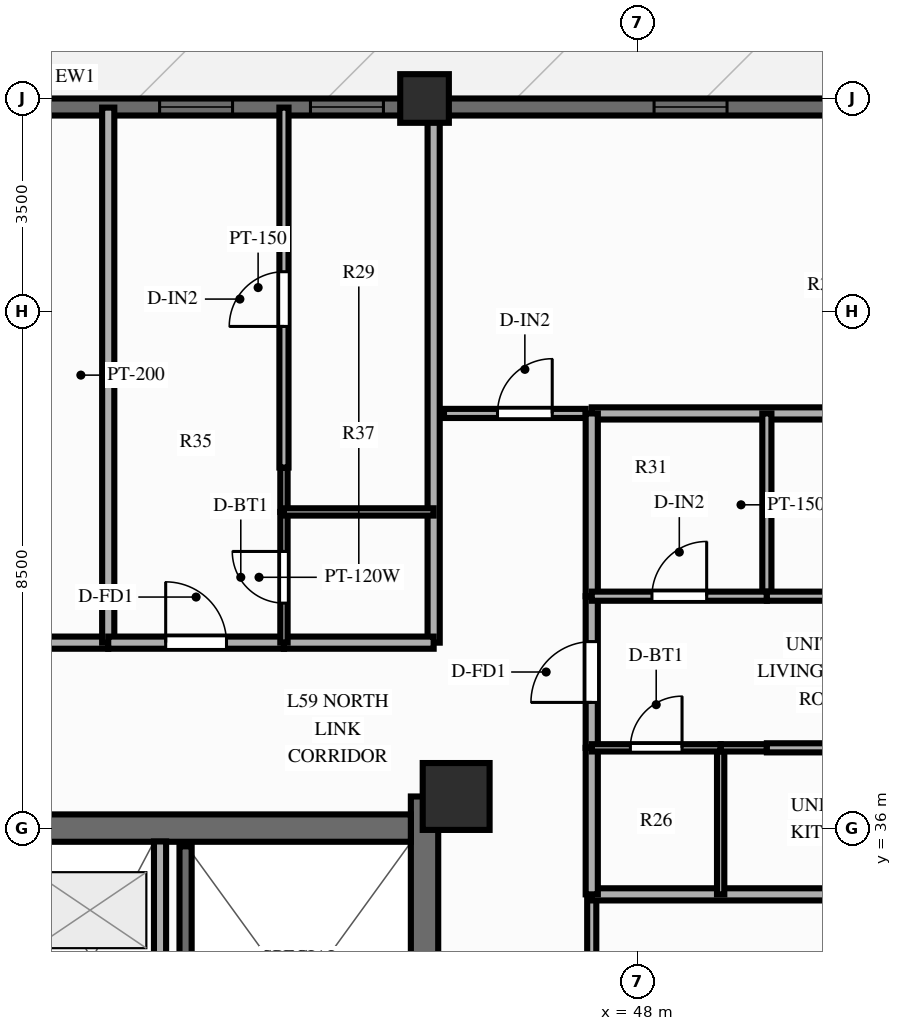
"""IFC4 building model, lengths in metres.
Left out: names, types, materials, properties, quantities, classifications, styles, units other than length and angle.
Written with IfcOpenShell. Run it as: python <this file> out.ifc"""

import sys

from ifc_helpers import new_model, si_unit, direction, frame, frame_2d, origin, origin_2d, place, context, subcontext, project, spatial, rectangle, extrude, source, transform, mapped, element, fill, save


model = new_model("IFC4")
c1 = context("Model", 3, precision=1e-05, world=origin(), true_north=direction((0.0, 1.0)))
c2 = subcontext(c1, "Body", "Model", "MODEL_VIEW")
j1 = project(units=[si_unit("LENGTHUNIT", "METRE"), si_unit("PLANEANGLEUNIT", "RADIAN")], contexts=[c1])
p1 = place(None, origin())
s1 = spatial("IfcSite", under=j1, at=p1, CompositionType="ELEMENT")
p2 = place(p1, origin())
s2 = spatial("IfcBuilding", under=s1, at=p2, CompositionType="ELEMENT")
p3 = place(p2, frame((0.0, 0.0, 189.7)))
s3 = spatial("IfcBuildingStorey", under=s2, at=p3, CompositionType="ELEMENT", Elevation=189.7)
p4 = place(p3, frame((44.5, 17.48, 0.0), z_axis=(0.0, 0.0, 1.0), x_axis=(0.0, 1.0, 0.0)))
e1 = element("IfcWall", 1, at=p4, inside=s3, PredefinedType="SHEAR", context=c2, shape_type="SweptSolid", body=[
    extrude(rectangle(XDim=19.04, YDim=0.45, at=frame_2d((9.52, 0.0))), origin(), (0.0, 0.0, 1.0), 3.0),
])
p5 = place(p4, frame((12.67, 0.0, 0.0), z_axis=(0.0, 0.0, 1.0), x_axis=(-1.0, 0.0, 0.0)))
e2 = element("IfcOpeningElement", 2, at=p5, cuts=e1, PredefinedType="OPENING", context=c2, shape_type="SweptSolid", body=[
    extrude(rectangle(XDim=1.1, YDim=2.15, at=frame_2d((0.55, 1.075))), frame((0.0, 0.237, 0.0), z_axis=(0.0, -1.0, 0.0), x_axis=(1.0, 0.0, 0.0)), (0.0, 0.0, 1.0), 0.474),
])
p6 = place(p3, frame((31.725, 36.0, 0.0), z_axis=(0.0, 0.0, 1.0), x_axis=(1.0, 0.0, 0.0)))
e3 = element("IfcWall", 3, at=p6, inside=s3, PredefinedType="SHEAR", context=c2, shape_type="SweptSolid", body=[
    extrude(rectangle(XDim=12.55, YDim=0.45, at=frame_2d((6.275, 0.0))), origin(), (0.0, 0.0, 1.0), 3.0),
])
p7 = place(p6, frame((5.225, 0.0, 0.0), z_axis=(0.0, 0.0, 1.0), x_axis=(-1.0, 0.0, 0.0)))
e4 = element("IfcOpeningElement", 4, at=p7, cuts=e3, PredefinedType="OPENING", context=c2, shape_type="SweptSolid", body=[
    extrude(rectangle(XDim=1.4, YDim=2.15, at=frame_2d((0.7, 1.075))), frame((0.0, 0.237, 0.0), z_axis=(0.0, -1.0, 0.0), x_axis=(1.0, 0.0, 0.0)), (0.0, 0.0, 1.0), 0.474),
])
m1 = source(origin(), c2, "Body", "SweptSolid", [
    extrude(rectangle(XDim=1.1, YDim=1.1, at=origin_2d()), origin(), (0.0, 0.0, 1.0), 3.0),
])
p8 = place(p3, frame((45.02, 36.52, 0.0), z_axis=(0.0, 0.0, 1.0), x_axis=(1.0, 0.0, 0.0)))
e5 = element("IfcColumn", 5, at=p8, inside=s3, PredefinedType="COLUMN", context=c2, shape_type="MappedRepresentation", body=[
    mapped(m1, transform((0.0, 0.0, 0.0), scale=1.0)),
])
m2 = source(origin(), c2, "Body", "SweptSolid", [
    extrude(rectangle(XDim=0.8, YDim=0.8, at=origin_2d()), origin(), (0.0, 0.0, 1.0), 3.0),
])
p9 = place(p3, frame((44.5, 48.0, 0.0), z_axis=(0.0, 0.0, 1.0), x_axis=(1.0, 0.0, 0.0)))
e6 = element("IfcColumn", 6, at=p9, inside=s3, PredefinedType="COLUMN", context=c2, shape_type="MappedRepresentation", body=[
    mapped(m2, transform((0.0, 0.0, 0.0), scale=1.0)),
])
p10 = place(p3, frame((22.75, 47.86, 0.0), z_axis=(0.0, 0.0, 1.0), x_axis=(1.0, 0.0, 0.0)))
e7 = element("IfcWall", 7, at=p10, inside=s3, PredefinedType="SOLIDWALL", context=c2, shape_type="SweptSolid", body=[
    extrude(rectangle(XDim=30.5, YDim=0.28, at=frame_2d((15.25, 0.0))), origin(), (0.0, 0.0, 1.0), 2.28),
])
p11 = place(p10, frame((3.825, 0.0, 0.0)))
e8 = element("IfcOpeningElement", 8, at=p11, cuts=e7, PredefinedType="OPENING", context=c2, shape_type="SweptSolid", body=[
    extrude(rectangle(XDim=1.1, YDim=2.15, at=frame_2d((0.55, 1.075))), frame((0.0, 0.152, 0.0), z_axis=(0.0, -1.0, 0.0), x_axis=(1.0, 0.0, 0.0)), (0.0, 0.0, 1.0), 0.304),
])
p12 = place(p10, frame((9.395, 0.0, 0.25)))
e9 = element("IfcOpeningElement", 9, at=p12, cuts=e7, PredefinedType="OPENING", context=c2, shape_type="SweptSolid", body=[
    extrude(rectangle(XDim=0.95, YDim=1.5, at=frame_2d((0.475, 0.75))), frame((0.0, 0.152, 0.0), z_axis=(0.0, -1.0, 0.0), x_axis=(1.0, 0.0, 0.0)), (0.0, 0.0, 1.0), 0.304),
])
p13 = place(p10, frame((11.483, 0.0, 0.25)))
e10 = element("IfcOpeningElement", 10, at=p13, cuts=e7, PredefinedType="OPENING", context=c2, shape_type="SweptSolid", body=[
    extrude(rectangle(XDim=1.2, YDim=1.5, at=frame_2d((0.6, 0.75))), frame((0.0, 0.152, 0.0), z_axis=(0.0, -1.0, 0.0), x_axis=(1.0, 0.0, 0.0)), (0.0, 0.0, 1.0), 0.304),
])
p14 = place(p10, frame((14.383, 0.0, 0.25)))
e11 = element("IfcOpeningElement", 11, at=p14, cuts=e7, PredefinedType="OPENING", context=c2, shape_type="SweptSolid", body=[
    extrude(rectangle(XDim=1.2, YDim=1.5, at=frame_2d((0.6, 0.75))), frame((0.0, 0.152, 0.0), z_axis=(0.0, -1.0, 0.0), x_axis=(1.0, 0.0, 0.0)), (0.0, 0.0, 1.0), 0.304),
])
p15 = place(p10, frame((17.393, 0.0, 0.25)))
e12 = element("IfcOpeningElement", 12, at=p15, cuts=e7, PredefinedType="OPENING", context=c2, shape_type="SweptSolid", body=[
    extrude(rectangle(XDim=1.2, YDim=1.5, at=frame_2d((0.6, 0.75))), frame((0.0, 0.152, 0.0), z_axis=(0.0, -1.0, 0.0), x_axis=(1.0, 0.0, 0.0)), (0.0, 0.0, 1.0), 0.304),
])
p16 = place(p10, frame((19.874, 0.0, 0.25)))
e13 = element("IfcOpeningElement", 13, at=p16, cuts=e7, PredefinedType="OPENING", context=c2, shape_type="SweptSolid", body=[
    extrude(rectangle(XDim=1.2, YDim=1.5, at=frame_2d((0.6, 0.75))), frame((0.0, 0.152, 0.0), z_axis=(0.0, -1.0, 0.0), x_axis=(1.0, 0.0, 0.0)), (0.0, 0.0, 1.0), 0.304),
])
p17 = place(p10, frame((25.525, 0.0, 0.25)))
e14 = element("IfcOpeningElement", 14, at=p17, cuts=e7, PredefinedType="OPENING", context=c2, shape_type="SweptSolid", body=[
    extrude(rectangle(XDim=1.2, YDim=1.5, at=frame_2d((0.6, 0.75))), frame((0.0, 0.152, 0.0), z_axis=(0.0, -1.0, 0.0), x_axis=(1.0, 0.0, 0.0)), (0.0, 0.0, 1.0), 0.304),
])
p18 = place(p3, frame((40.15, 31.8, 0.0), z_axis=(0.0, 0.0, 1.0), x_axis=(0.0, 1.0, 0.0)))
e15 = element("IfcWall", 15, at=p18, inside=s3, PredefinedType="PARTITIONING", context=c2, shape_type="SweptSolid", body=[
    extrude(rectangle(XDim=3.98, YDim=0.2, at=frame_2d((1.99, 0.0))), origin(), (0.0, 0.0, 1.0), 2.79),
])
p19 = place(p3, frame((40.57, 28.65, 0.0), z_axis=(0.0, 0.0, 1.0), x_axis=(0.0, 1.0, 0.0)))
e16 = element("IfcWall", 16, at=p19, inside=s3, PredefinedType="SOLIDWALL", context=c2, shape_type="SweptSolid", body=[
    extrude(rectangle(XDim=7.05, YDim=0.2, at=frame_2d((3.525, 0.0))), origin(), (0.0, 0.0, 1.0), 2.79),
])
p20 = place(p3, frame((44.82, 42.82, 0.0), z_axis=(0.0, 0.0, 1.0), x_axis=(1.0, 0.0, 0.0)))
e17 = element("IfcWall", 17, at=p20, inside=s3, PredefinedType="PARTITIONING", context=c2, shape_type="SweptSolid", body=[
    extrude(rectangle(XDim=2.33, YDim=0.15, at=frame_2d((1.165, 0.0))), origin(), (0.0, 0.0, 1.0), 2.79),
])
p21 = place(p20, frame((0.88, 0.0, 0.0)))
e18 = element("IfcOpeningElement", 18, at=p21, cuts=e17, PredefinedType="OPENING", context=c2, shape_type="SweptSolid", body=[
    extrude(rectangle(XDim=0.9, YDim=2.1, at=frame_2d((0.45, 1.05))), frame((0.0, 0.087, 0.0), z_axis=(0.0, -1.0, 0.0), x_axis=(1.0, 0.0, 0.0)), (0.0, 0.0, 1.0), 0.174),
])
p22 = place(p3, frame((44.65, 39.05, 0.0), z_axis=(0.0, 0.0, 1.0), x_axis=(0.0, 1.0, 0.0)))
e19 = element("IfcWall", 19, at=p22, inside=s3, PredefinedType="PARTITIONING", context=c2, shape_type="SweptSolid", body=[
    extrude(rectangle(XDim=8.8, YDim=0.2, at=frame_2d((4.4, 0.0))), origin(), (0.0, 0.0, 1.0), 2.39),
])
p23 = place(p3, frame((36.167, 39.05, 0.0), z_axis=(0.0, 0.0, 1.0), x_axis=(1.0, 0.0, 0.0)))
e20 = element("IfcWall", 20, at=p23, inside=s3, PredefinedType="PARTITIONING", context=c2, shape_type="SweptSolid", body=[
    extrude(rectangle(XDim=3.131, YDim=0.2, at=frame_2d((1.565, 0.0))), origin(), (0.0, 0.0, 1.0), 2.79),
])
p24 = place(p23, frame((1.065, 0.0, 0.0)))
e21 = element("IfcOpeningElement", 21, at=p24, cuts=e20, PredefinedType="OPENING", context=c2, shape_type="SweptSolid", body=[
    extrude(rectangle(XDim=1.0, YDim=2.15, at=frame_2d((0.5, 1.075))), frame((0.0, 0.112, 0.0), z_axis=(0.0, -1.0, 0.0), x_axis=(1.0, 0.0, 0.0)), (0.0, 0.0, 1.0), 0.224),
])
p25 = place(p3, frame((39.298, 39.05, 0.0), z_axis=(0.0, 0.0, 1.0), x_axis=(0.0, 1.0, 0.0)))
e22 = element("IfcWall", 22, at=p25, inside=s3, PredefinedType="PARTITIONING", context=c2, shape_type="SweptSolid", body=[
    extrude(rectangle(XDim=8.8, YDim=0.2, at=frame_2d((4.4, 0.0))), origin(), (0.0, 0.0, 1.0), 2.79),
])
p26 = place(p3, frame((39.298, 39.05, 0.0), z_axis=(0.0, 0.0, 1.0), x_axis=(1.0, 0.0, 0.0)))
e23 = element("IfcWall", 23, at=p26, inside=s3, PredefinedType="PARTITIONING", context=c2, shape_type="SweptSolid", body=[
    extrude(rectangle(XDim=2.89, YDim=0.2, at=frame_2d((1.445, 0.0))), origin(), (0.0, 0.0, 1.0), 2.79),
])
p27 = place(p26, frame((0.945, 0.0, 0.0)))
e24 = element("IfcOpeningElement", 24, at=p27, cuts=e23, PredefinedType="OPENING", context=c2, shape_type="SweptSolid", body=[
    extrude(rectangle(XDim=1.0, YDim=2.15, at=frame_2d((0.5, 1.075))), frame((0.0, 0.112, 0.0), z_axis=(0.0, -1.0, 0.0), x_axis=(1.0, 0.0, 0.0)), (0.0, 0.0, 1.0), 0.224),
])
p28 = place(p3, frame((42.188, 39.05, 0.0), z_axis=(0.0, 0.0, 1.0), x_axis=(1.0, 0.0, 0.0)))
e25 = element("IfcWall", 25, at=p28, inside=s3, PredefinedType="PARTITIONING", context=c2, shape_type="SweptSolid", body=[
    extrude(rectangle(XDim=2.462, YDim=0.2, at=frame_2d((1.231, 0.0))), origin(), (0.0, 0.0, 1.0), 2.79),
])
p29 = place(p3, frame((42.188, 39.05, 0.0), z_axis=(0.0, 0.0, 1.0), x_axis=(0.0, 1.0, 0.0)))
e26 = element("IfcWall", 26, at=p29, inside=s3, PredefinedType="PARTITIONING", context=c2, shape_type="SweptSolid", body=[
    extrude(rectangle(XDim=2.15, YDim=0.12, at=frame_2d((1.075, 0.0))), origin(), (0.0, 0.0, 1.0), 2.79),
])
p30 = place(p29, frame((0.65, 0.0, 0.0)))
e27 = element("IfcOpeningElement", 27, at=p30, cuts=e26, PredefinedType="OPENING", context=c2, shape_type="SweptSolid", body=[
    extrude(rectangle(XDim=0.85, YDim=2.05, at=frame_2d((0.425, 1.025))), frame((0.0, 0.072, 0.0), z_axis=(0.0, -1.0, 0.0), x_axis=(1.0, 0.0, 0.0)), (0.0, 0.0, 1.0), 0.144),
])
p31 = place(p3, frame((42.188, 41.2, 0.0), z_axis=(0.0, 0.0, 1.0), x_axis=(0.0, 1.0, 0.0)))
e28 = element("IfcWall", 28, at=p31, inside=s3, PredefinedType="PARTITIONING", context=c2, shape_type="SweptSolid", body=[
    extrude(rectangle(XDim=0.73, YDim=0.12, at=frame_2d((0.365, 0.0))), origin(), (0.0, 0.0, 1.0), 2.79),
])
p32 = place(p3, frame((42.188, 41.2, 0.0), z_axis=(0.0, 0.0, 1.0), x_axis=(1.0, 0.0, 0.0)))
e29 = element("IfcWall", 29, at=p32, inside=s3, PredefinedType="PARTITIONING", context=c2, shape_type="SweptSolid", body=[
    extrude(rectangle(XDim=2.462, YDim=0.12, at=frame_2d((1.231, 0.0))), origin(), (0.0, 0.0, 1.0), 2.79),
])
p33 = place(p3, frame((42.188, 41.93, 0.0), z_axis=(0.0, 0.0, 1.0), x_axis=(0.0, 1.0, 0.0)))
e30 = element("IfcWall", 30, at=p33, inside=s3, PredefinedType="PARTITIONING", context=c2, shape_type="SweptSolid", body=[
    extrude(rectangle(XDim=5.92, YDim=0.15, at=frame_2d((2.96, 0.0))), origin(), (0.0, 0.0, 1.0), 2.79),
])
p34 = place(p33, frame((2.321, 0.0, 0.0)))
e31 = element("IfcOpeningElement", 31, at=p34, cuts=e30, PredefinedType="OPENING", context=c2, shape_type="SweptSolid", body=[
    extrude(rectangle(XDim=0.9, YDim=2.1, at=frame_2d((0.45, 1.05))), frame((0.0, 0.087, 0.0), z_axis=(0.0, -1.0, 0.0), x_axis=(1.0, 0.0, 0.0)), (0.0, 0.0, 1.0), 0.174),
])
p35 = place(p3, frame((47.25, 42.82, 0.0), z_axis=(0.0, 0.0, 1.0), x_axis=(1.0, 0.0, 0.0)))
e32 = element("IfcWall", 32, at=p35, inside=s3, PredefinedType="PARTITIONING", context=c2, shape_type="SweptSolid", body=[
    extrude(rectangle(XDim=10.85, YDim=0.2, at=frame_2d((5.425, 0.0))), origin(), (0.0, 0.0, 1.0), 2.79),
])
p36 = place(p3, frame((47.25, 27.0, 0.0), z_axis=(0.0, 0.0, 1.0), x_axis=(0.0, 1.0, 0.0)))
e33 = element("IfcWall", 33, at=p36, inside=s3, PredefinedType="PARTITIONING", context=c2, shape_type="SweptSolid", body=[
    extrude(rectangle(XDim=7.91, YDim=0.15, at=frame_2d((3.955, 0.0))), origin(), (0.0, 0.0, 1.0), 2.79),
])
p37 = place(p36, frame((3.405, 0.0, 0.0)))
e34 = element("IfcOpeningElement", 34, at=p37, cuts=e33, PredefinedType="OPENING", context=c2, shape_type="SweptSolid", body=[
    extrude(rectangle(XDim=1.1, YDim=2.15, at=frame_2d((0.55, 1.075))), frame((0.0, 0.087, 0.0), z_axis=(0.0, -1.0, 0.0), x_axis=(1.0, 0.0, 0.0)), (0.0, 0.0, 1.0), 0.174),
])
p38 = place(p3, frame((47.25, 34.91, 0.0), z_axis=(0.0, 0.0, 1.0), x_axis=(1.0, 0.0, 0.0)))
e35 = element("IfcWall", 35, at=p38, inside=s3, PredefinedType="PARTITIONING", context=c2, shape_type="SweptSolid", body=[
    extrude(rectangle(XDim=10.85, YDim=0.2, at=frame_2d((5.425, 0.0))), origin(), (0.0, 0.0, 1.0), 2.79),
])
p39 = place(p3, frame((47.25, 34.91, 0.0), z_axis=(0.0, 0.0, 1.0), x_axis=(0.0, 1.0, 0.0)))
e36 = element("IfcWall", 36, at=p39, inside=s3, PredefinedType="PARTITIONING", context=c2, shape_type="SweptSolid", body=[
    extrude(rectangle(XDim=2.41, YDim=0.2, at=frame_2d((1.205, 0.0))), origin(), (0.0, 0.0, 1.0), 2.79),
])
p40 = place(p3, frame((47.25, 37.32, 0.0), z_axis=(0.0, 0.0, 1.0), x_axis=(0.0, 1.0, 0.0)))
e37 = element("IfcWall", 37, at=p40, inside=s3, PredefinedType="PARTITIONING", context=c2, shape_type="SweptSolid", body=[
    extrude(rectangle(XDim=2.494, YDim=0.2, at=frame_2d((1.247, 0.0))), origin(), (0.0, 0.0, 1.0), 2.79),
])
p41 = place(p40, frame((0.747, 0.0, 0.0)))
e38 = element("IfcOpeningElement", 38, at=p41, cuts=e37, PredefinedType="OPENING", context=c2, shape_type="SweptSolid", body=[
    extrude(rectangle(XDim=1.0, YDim=2.15, at=frame_2d((0.5, 1.075))), frame((0.0, 0.112, 0.0), z_axis=(0.0, -1.0, 0.0), x_axis=(1.0, 0.0, 0.0)), (0.0, 0.0, 1.0), 0.224),
])
p42 = place(p3, frame((47.25, 39.814, 0.0), z_axis=(0.0, 0.0, 1.0), x_axis=(0.0, 1.0, 0.0)))
e39 = element("IfcWall", 39, at=p42, inside=s3, PredefinedType="PARTITIONING", context=c2, shape_type="SweptSolid", body=[
    extrude(rectangle(XDim=3.006, YDim=0.2, at=frame_2d((1.503, 0.0))), origin(), (0.0, 0.0, 1.0), 2.79),
])
p43 = place(p3, frame((49.37, 34.91, 0.0), z_axis=(0.0, 0.0, 1.0), x_axis=(0.0, 1.0, 0.0)))
e40 = element("IfcWall", 40, at=p43, inside=s3, PredefinedType="PARTITIONING", context=c2, shape_type="SweptSolid", body=[
    extrude(rectangle(XDim=2.41, YDim=0.12, at=frame_2d((1.205, 0.0))), origin(), (0.0, 0.0, 1.0), 2.79),
])
p44 = place(p3, frame((50.13, 39.814, 0.0), z_axis=(0.0, 0.0, 1.0), x_axis=(0.0, 1.0, 0.0)))
e41 = element("IfcWall", 41, at=p44, inside=s3, PredefinedType="PARTITIONING", context=c2, shape_type="SweptSolid", body=[
    extrude(rectangle(XDim=3.006, YDim=0.15, at=frame_2d((1.503, 0.0))), origin(), (0.0, 0.0, 1.0), 2.79),
])
p45 = place(p3, frame((47.25, 37.32, 0.0), z_axis=(0.0, 0.0, 1.0), x_axis=(1.0, 0.0, 0.0)))
e42 = element("IfcWall", 42, at=p45, inside=s3, PredefinedType="PARTITIONING", context=c2, shape_type="SweptSolid", body=[
    extrude(rectangle(XDim=2.12, YDim=0.12, at=frame_2d((1.06, 0.0))), origin(), (0.0, 0.0, 1.0), 2.79),
])
p46 = place(p45, frame((0.635, 0.0, 0.0)))
e43 = element("IfcOpeningElement", 43, at=p46, cuts=e42, PredefinedType="OPENING", context=c2, shape_type="SweptSolid", body=[
    extrude(rectangle(XDim=0.85, YDim=2.05, at=frame_2d((0.425, 1.025))), frame((0.0, 0.072, 0.0), z_axis=(0.0, -1.0, 0.0), x_axis=(1.0, 0.0, 0.0)), (0.0, 0.0, 1.0), 0.144),
])
p47 = place(p3, frame((49.37, 37.32, 0.0), z_axis=(0.0, 0.0, 1.0), x_axis=(1.0, 0.0, 0.0)))
e44 = element("IfcWall", 44, at=p47, inside=s3, PredefinedType="PARTITIONING", context=c2, shape_type="SweptSolid", body=[
    extrude(rectangle(XDim=0.76, YDim=0.12, at=frame_2d((0.38, 0.0))), origin(), (0.0, 0.0, 1.0), 2.79),
])
p48 = place(p3, frame((50.13, 37.32, 0.0), z_axis=(0.0, 0.0, 1.0), x_axis=(1.0, 0.0, 0.0)))
e45 = element("IfcWall", 45, at=p48, inside=s3, PredefinedType="PARTITIONING", context=c2, shape_type="SweptSolid", body=[
    extrude(rectangle(XDim=7.97, YDim=0.15, at=frame_2d((3.985, 0.0))), origin(), (0.0, 0.0, 1.0), 2.79),
])
p49 = place(p48, frame((3.26, 0.0, 0.0)))
e46 = element("IfcOpeningElement", 46, at=p49, cuts=e45, PredefinedType="OPENING", context=c2, shape_type="SweptSolid", body=[
    extrude(rectangle(XDim=0.9, YDim=2.1, at=frame_2d((0.45, 1.05))), frame((0.0, 0.087, 0.0), z_axis=(0.0, -1.0, 0.0), x_axis=(1.0, 0.0, 0.0)), (0.0, 0.0, 1.0), 0.174),
])
p50 = place(p3, frame((47.25, 39.814, 0.0), z_axis=(0.0, 0.0, 1.0), x_axis=(1.0, 0.0, 0.0)))
e47 = element("IfcWall", 47, at=p50, inside=s3, PredefinedType="PARTITIONING", context=c2, shape_type="SweptSolid", body=[
    extrude(rectangle(XDim=2.88, YDim=0.15, at=frame_2d((1.44, 0.0))), origin(), (0.0, 0.0, 1.0), 2.79),
])
p51 = place(p50, frame((0.99, 0.0, 0.0)))
e48 = element("IfcOpeningElement", 48, at=p51, cuts=e47, PredefinedType="OPENING", context=c2, shape_type="SweptSolid", body=[
    extrude(rectangle(XDim=0.9, YDim=2.1, at=frame_2d((0.45, 1.05))), frame((0.0, 0.087, 0.0), z_axis=(0.0, -1.0, 0.0), x_axis=(1.0, 0.0, 0.0)), (0.0, 0.0, 1.0), 0.174),
])
p52 = place(p3, frame((50.13, 39.814, 0.0), z_axis=(0.0, 0.0, 1.0), x_axis=(1.0, 0.0, 0.0)))
e49 = element("IfcWall", 49, at=p52, inside=s3, PredefinedType="PARTITIONING", context=c2, shape_type="SweptSolid", body=[
    extrude(rectangle(XDim=7.97, YDim=0.15, at=frame_2d((3.985, 0.0))), origin(), (0.0, 0.0, 1.0), 2.79),
])
p53 = place(p52, frame((3.26, 0.0, 0.0)))
e50 = element("IfcOpeningElement", 50, at=p53, cuts=e49, PredefinedType="OPENING", context=c2, shape_type="SweptSolid", body=[
    extrude(rectangle(XDim=0.9, YDim=2.1, at=frame_2d((0.45, 1.05))), frame((0.0, 0.087, 0.0), z_axis=(0.0, -1.0, 0.0), x_axis=(1.0, 0.0, 0.0)), (0.0, 0.0, 1.0), 0.174),
])
m3 = source(origin(), c2, "Body", "SweptSolid", [
    extrude(rectangle(XDim=1.2, YDim=1.5, at=frame_2d((0.6, 0.75))), frame((0.0, 0.03, 0.0), z_axis=(0.0, -1.0, 0.0), x_axis=(1.0, 0.0, 0.0)), (0.0, 0.0, 1.0), 0.06),
])
p54 = place(p15, origin())
e51 = element("IfcWindow", 51, at=p54, inside=s3, PartitioningType="SINGLE_PANEL", PredefinedType="WINDOW", context=c2, shape_type="MappedRepresentation", body=[
    mapped(m3, transform((0.0, 0.0, 0.0), scale=1.0)),
])
fill(e12, e51)
p55 = place(p16, origin())
e52 = element("IfcWindow", 52, at=p55, inside=s3, PartitioningType="SINGLE_PANEL", PredefinedType="WINDOW", context=c2, shape_type="MappedRepresentation", body=[
    mapped(m3, transform((0.0, 0.0, 0.0), scale=1.0)),
])
fill(e13, e52)
p56 = place(p17, origin())
e53 = element("IfcWindow", 53, at=p56, inside=s3, PartitioningType="SINGLE_PANEL", PredefinedType="WINDOW", context=c2, shape_type="MappedRepresentation", body=[
    mapped(m3, transform((0.0, 0.0, 0.0), scale=1.0)),
])
fill(e14, e53)
m4 = source(origin(), c2, "Body", "SweptSolid", [
    extrude(rectangle(XDim=0.9, YDim=2.1, at=frame_2d((0.45, 1.05))), frame((0.0, 0.025, 0.0), z_axis=(0.0, -1.0, 0.0), x_axis=(1.0, 0.0, 0.0)), (0.0, 0.0, 1.0), 0.05),
])
p57 = place(p21, origin())
e54 = element("IfcDoor", 54, at=p57, inside=s3, OperationType="SINGLE_SWING_RIGHT", PredefinedType="DOOR", context=c2, shape_type="MappedRepresentation", body=[
    mapped(m4, transform((0.0, 0.0, 0.0), scale=1.0)),
])
fill(e18, e54)
m5 = source(origin(), c2, "Body", "SweptSolid", [
    extrude(rectangle(XDim=1.0, YDim=2.15, at=frame_2d((0.5, 1.075))), frame((0.0, 0.025, 0.0), z_axis=(0.0, -1.0, 0.0), x_axis=(1.0, 0.0, 0.0)), (0.0, 0.0, 1.0), 0.05),
])
p58 = place(p27, origin())
e55 = element("IfcDoor", 55, at=p58, inside=s3, OperationType="SINGLE_SWING_LEFT", PredefinedType="DOOR", context=c2, shape_type="MappedRepresentation", body=[
    mapped(m5, transform((0.0, 0.0, 0.0), scale=1.0)),
])
fill(e24, e55)
m6 = source(origin(), c2, "Body", "SweptSolid", [
    extrude(rectangle(XDim=0.85, YDim=2.05, at=frame_2d((0.425, 1.025))), frame((0.0, 0.025, 0.0), z_axis=(0.0, -1.0, 0.0), x_axis=(1.0, 0.0, 0.0)), (0.0, 0.0, 1.0), 0.05),
])
p59 = place(p30, origin())
e56 = element("IfcDoor", 56, at=p59, inside=s3, OperationType="SINGLE_SWING_RIGHT", PredefinedType="DOOR", context=c2, shape_type="MappedRepresentation", body=[
    mapped(m6, transform((0.0, 0.0, 0.0), scale=1.0)),
])
fill(e27, e56)
p60 = place(p34, origin())
e57 = element("IfcDoor", 57, at=p60, inside=s3, OperationType="SINGLE_SWING_LEFT", PredefinedType="DOOR", context=c2, shape_type="MappedRepresentation", body=[
    mapped(m4, transform((0.0, 0.0, 0.0), scale=1.0)),
])
fill(e31, e57)
p61 = place(p41, origin())
e58 = element("IfcDoor", 58, at=p61, inside=s3, OperationType="SINGLE_SWING_LEFT", PredefinedType="DOOR", context=c2, shape_type="MappedRepresentation", body=[
    mapped(m5, transform((0.0, 0.0, 0.0), scale=1.0)),
])
fill(e38, e58)
p62 = place(p46, origin())
e59 = element("IfcDoor", 59, at=p62, inside=s3, OperationType="SINGLE_SWING_RIGHT", PredefinedType="DOOR", context=c2, shape_type="MappedRepresentation", body=[
    mapped(m6, transform((0.0, 0.0, 0.0), scale=1.0)),
])
fill(e43, e59)
p63 = place(p51, origin())
e60 = element("IfcDoor", 60, at=p63, inside=s3, OperationType="SINGLE_SWING_RIGHT", PredefinedType="DOOR", context=c2, shape_type="MappedRepresentation", body=[
    mapped(m4, transform((0.0, 0.0, 0.0), scale=1.0)),
])
fill(e48, e60)
save(model, sys.argv[1])
